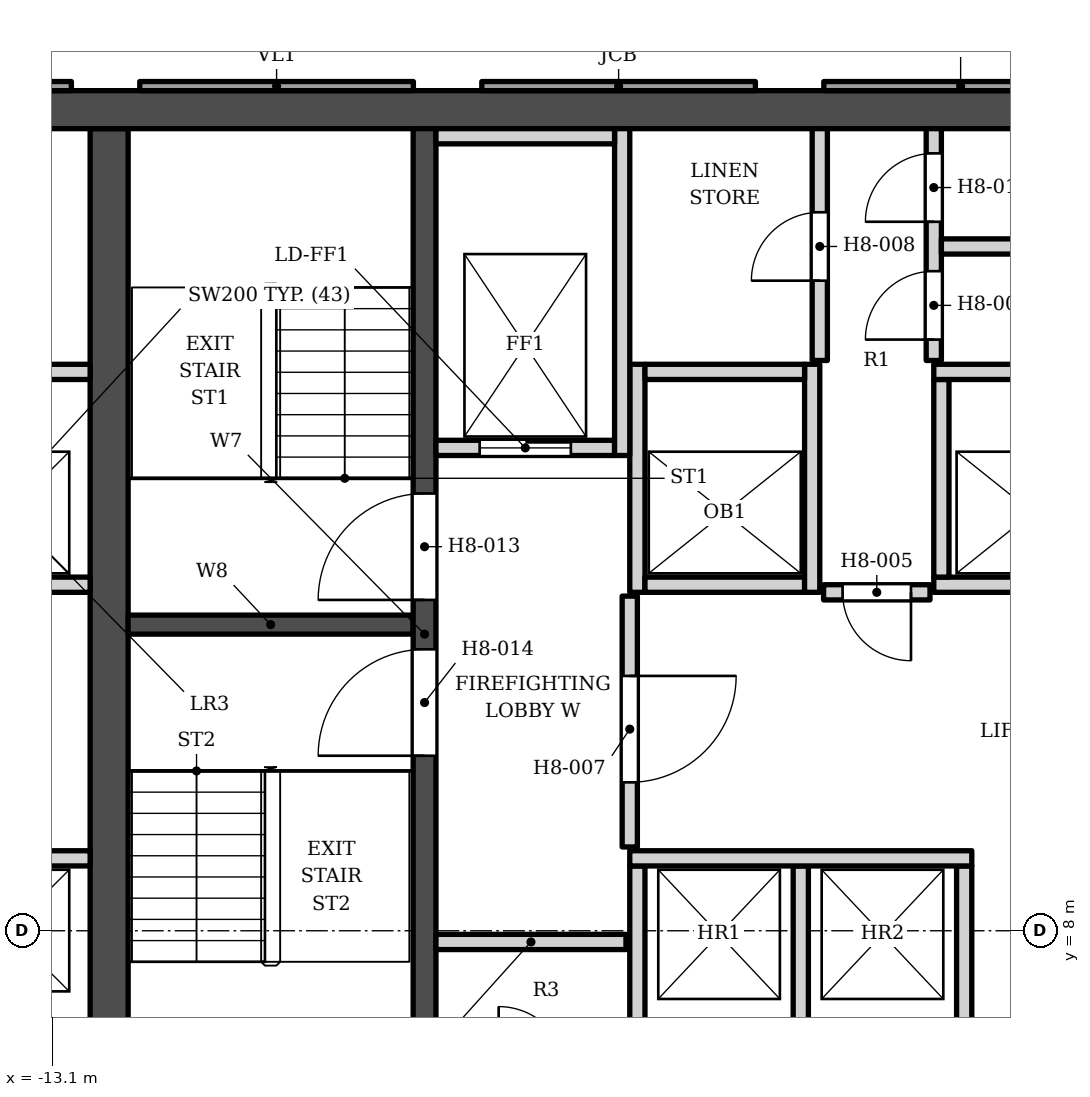
"""IFC4 building model, lengths in metres.
Left out: names, types, materials, properties, quantities, classifications, styles, units other than length and angle.
Written with IfcOpenShell. Run it as: python <this file> out.ifc"""

import sys

from ifc_helpers import new_model, si_unit, direction, frame, frame_2d, origin, place, context, subcontext, project, spatial, polyline, rectangle, outline, extrude, element, fill, save


model = new_model("IFC4")
c1 = context("Model", 3, precision=1e-05, world=origin(), true_north=direction((0.0, 1.0)))
c2 = subcontext(c1, "Body", "Model", "MODEL_VIEW")
j1 = project(units=[si_unit("LENGTHUNIT", "METRE"), si_unit("PLANEANGLEUNIT", "RADIAN")], contexts=[c1])
p1 = place(None, origin())
s1 = spatial("IfcSite", under=j1, at=p1, CompositionType="ELEMENT")
p2 = place(p1, origin())
s2 = spatial("IfcBuilding", under=s1, at=p2, CompositionType="ELEMENT")
p3 = place(p2, frame((0.0, 0.0, 122.4)))
s3 = spatial("IfcBuildingStorey", under=s2, at=p3, CompositionType="ELEMENT", Elevation=122.4)
p4 = place(p3, frame((-16.9, 18.802, 0.0), z_axis=(0.0, 0.0, 1.0), x_axis=(1.0, 0.0, 0.0)))
e1 = element("IfcWall", 1, at=p4, inside=s3, PredefinedType="SHEAR", context=c2, shape_type="SweptSolid", body=[
    extrude(rectangle(XDim=33.8, YDim=0.5, at=frame_2d((16.9, 0.0))), origin(), (0.0, 0.0, 1.0), 3.4),
])
p5 = place(p3, frame((-12.35, 5.253, 0.0), z_axis=(0.0, 0.0, 1.0), x_axis=(0.0, 1.0, 0.0)))
e2 = element("IfcWall", 2, at=p5, inside=s3, PredefinedType="SHEAR", context=c2, shape_type="SweptSolid", body=[
    extrude(rectangle(XDim=13.3, YDim=0.5, at=frame_2d((6.65, 0.0))), origin(), (0.0, 0.0, 1.0), 3.4),
])
p6 = place(p3, frame((-8.2, 5.253, 0.0), z_axis=(0.0, 0.0, 1.0), x_axis=(0.0, 1.0, 0.0)))
e3 = element("IfcWall", 3, at=p6, inside=s3, PredefinedType="SHEAR", context=c2, shape_type="SweptSolid", body=[
    extrude(rectangle(XDim=13.3, YDim=0.3, at=frame_2d((6.65, 0.0))), origin(), (0.0, 0.0, 1.0), 3.4),
])
p7 = place(p6, frame((7.1, 0.0, 0.0)))
e4 = element("IfcOpeningElement", 4, at=p7, cuts=e3, PredefinedType="OPENING", context=c2, shape_type="SweptSolid", body=[
    extrude(rectangle(XDim=1.4, YDim=2.1, at=frame_2d((0.7, 1.05))), frame((0.0, 0.16, 0.0), z_axis=(0.0, -1.0, 0.0), x_axis=(1.0, 0.0, 0.0)), (0.0, 0.0, 1.0), 0.32),
])
p8 = place(p6, frame((5.05, 0.0, 0.0)))
e5 = element("IfcOpeningElement", 5, at=p8, cuts=e3, PredefinedType="OPENING", context=c2, shape_type="SweptSolid", body=[
    extrude(rectangle(XDim=1.4, YDim=2.1, at=frame_2d((0.7, 1.05))), frame((0.0, 0.16, 0.0), z_axis=(0.0, -1.0, 0.0), x_axis=(1.0, 0.0, 0.0)), (0.0, 0.0, 1.0), 0.32),
])
p9 = place(p3, frame((-12.1, 12.028, 0.0), z_axis=(0.0, 0.0, 1.0), x_axis=(1.0, 0.0, 0.0)))
e6 = element("IfcWall", 6, at=p9, inside=s3, PredefinedType="SHEAR", context=c2, shape_type="SweptSolid", body=[
    extrude(rectangle(XDim=3.75, YDim=0.25, at=frame_2d((1.875, 0.0))), origin(), (0.0, 0.0, 1.0), 3.4),
])
p10 = place(p3, origin())
e7 = element("IfcWall", 7, at=p10, inside=s3, PredefinedType="ELEMENTEDWALL", context=c2, shape_type="SweptSolid", body=[
    extrude(outline(polyline([(-2.947, 19.173), (-2.947, 19.052), (0.653, 19.052), (0.653, 19.173), (-2.947, 19.173)])), origin(), (0.0, 0.0, 1.0), 2.65),
])
p11 = place(p3, origin())
e8 = element("IfcWall", 8, at=p11, inside=s3, PredefinedType="SOLIDWALL", context=c2, shape_type="SweptSolid", body=[
    extrude(outline(polyline([(-7.447, 19.173), (-7.447, 19.052), (-3.847, 19.052), (-3.847, 19.173), (-7.447, 19.173)])), origin(), (0.0, 0.0, 1.0), 2.65),
])
p12 = place(p3, origin())
e9 = element("IfcWall", 9, at=p12, inside=s3, PredefinedType="ELEMENTEDWALL", context=c2, shape_type="SweptSolid", body=[
    extrude(outline(polyline([(-11.947, 19.173), (-11.947, 19.052), (-8.347, 19.052), (-8.347, 19.173), (-11.947, 19.173)])), origin(), (0.0, 0.0, 1.0), 2.65),
])
p13 = place(p3, origin())
e10 = element("IfcWall", 10, at=p13, inside=s3, PredefinedType="SOLIDWALL", context=c2, shape_type="SweptSolid", body=[
    extrude(outline(polyline([(-16.446, 19.173), (-16.446, 19.052), (-12.847, 19.052), (-12.847, 19.173), (-16.446, 19.173)])), origin(), (0.0, 0.0, 1.0), 2.65),
])
for number, where, z_axis, x_axis in (
    (11, (-5.4, 6.353, 0.0), (0.0, 0.0, 1.0), (0.0, 1.0, 0.0)),
    (12, (-3.25, 6.353, 0.0), (0.0, 0.0, 1.0), (0.0, 1.0, 0.0)),
    (13, (-1.1, 6.353, 0.0), (0.0, 0.0, 1.0), (0.0, 1.0, 0.0)),
    (14, (-8.05, 7.853, 0.0), (0.0, 0.0, 1.0), (1.0, 0.0, 0.0)),
):
    element("IfcWall", number, at=place(p3, frame(where, z_axis=z_axis, x_axis=x_axis)), inside=s3, PredefinedType="SOLIDWALL", context=c2, shape_type="SweptSolid", body=[
        extrude(rectangle(XDim=2.5, YDim=0.2, at=frame_2d((1.25, 0.0))), origin(), (0.0, 0.0, 1.0), 3.23),
    ])
p14 = place(p3, frame((-16.9, 8.953, 0.0), z_axis=(0.0, 0.0, 1.0), x_axis=(1.0, 0.0, 0.0)))
e15 = element("IfcWall", 15, at=p14, inside=s3, PredefinedType="SOLIDWALL", context=c2, shape_type="SweptSolid", body=[
    extrude(rectangle(XDim=4.3, YDim=0.2, at=frame_2d((2.15, 0.0))), origin(), (0.0, 0.0, 1.0), 3.23),
])
p15 = place(p14, frame((2.675, 0.0, 0.0)))
e16 = element("IfcOpeningElement", 16, at=p15, cuts=e15, PredefinedType="OPENING", context=c2, shape_type="SweptSolid", body=[
    extrude(rectangle(XDim=1.1, YDim=2.1, at=frame_2d((0.55, 1.05))), frame((0.0, 0.11, 0.0), z_axis=(0.0, -1.0, 0.0), x_axis=(1.0, 0.0, 0.0)), (0.0, 0.0, 1.0), 0.22),
])
p16 = place(p14, frame((0.425, 0.0, 0.0)))
e17 = element("IfcOpeningElement", 17, at=p16, cuts=e15, PredefinedType="OPENING", context=c2, shape_type="SweptSolid", body=[
    extrude(rectangle(XDim=1.1, YDim=2.1, at=frame_2d((0.55, 1.05))), frame((0.0, 0.11, 0.0), z_axis=(0.0, -1.0, 0.0), x_axis=(1.0, 0.0, 0.0)), (0.0, 0.0, 1.0), 0.22),
])
p17 = place(p3, frame((-5.5, 8.953, 0.0), z_axis=(0.0, 0.0, 1.0), x_axis=(1.0, 0.0, 0.0)))
e18 = element("IfcWall", 18, at=p17, inside=s3, PredefinedType="SOLIDWALL", context=c2, shape_type="SweptSolid", body=[
    extrude(rectangle(XDim=4.5, YDim=0.2, at=frame_2d((2.25, 0.0))), origin(), (0.0, 0.0, 1.0), 3.23),
])
p18 = place(p3, frame((-5.5, 9.103, 0.0), z_axis=(0.0, 0.0, 1.0), x_axis=(0.0, 1.0, 0.0)))
e19 = element("IfcWall", 19, at=p18, inside=s3, PredefinedType="SOLIDWALL", context=c2, shape_type="SweptSolid", body=[
    extrude(rectangle(XDim=3.3, YDim=0.2, at=frame_2d((1.65, 0.0))), origin(), (0.0, 0.0, 1.0), 3.23),
])
p19 = place(p18, frame((0.85, 0.0, 0.0)))
e20 = element("IfcOpeningElement", 20, at=p19, cuts=e19, PredefinedType="OPENING", context=c2, shape_type="SweptSolid", body=[
    extrude(rectangle(XDim=1.4, YDim=2.1, at=frame_2d((0.7, 1.05))), frame((0.0, 0.11, 0.0), z_axis=(0.0, -1.0, 0.0), x_axis=(1.0, 0.0, 0.0)), (0.0, 0.0, 1.0), 0.22),
])
p20 = place(p3, frame((-2.95, 12.453, 0.0), z_axis=(0.0, 0.0, 1.0), x_axis=(1.0, 0.0, 0.0)))
e21 = element("IfcWall", 21, at=p20, inside=s3, PredefinedType="SOLIDWALL", context=c2, shape_type="SweptSolid", body=[
    extrude(rectangle(XDim=1.4, YDim=0.2, at=frame_2d((0.7, 0.0))), origin(), (0.0, 0.0, 1.0), 3.23),
])
p21 = place(p20, frame((0.25, 0.0, 0.0)))
e22 = element("IfcOpeningElement", 22, at=p21, cuts=e21, PredefinedType="OPENING", context=c2, shape_type="SweptSolid", body=[
    extrude(rectangle(XDim=0.9, YDim=2.1, at=frame_2d((0.45, 1.05))), frame((0.0, 0.11, 0.0), z_axis=(0.0, -1.0, 0.0), x_axis=(1.0, 0.0, 0.0)), (0.0, 0.0, 1.0), 0.22),
])
p22 = place(p3, frame((-16.9, 12.552, 0.0), z_axis=(0.0, 0.0, 1.0), x_axis=(1.0, 0.0, 0.0)))
e23 = element("IfcWall", 23, at=p22, inside=s3, PredefinedType="SOLIDWALL", context=c2, shape_type="SweptSolid", body=[
    extrude(rectangle(XDim=4.3, YDim=0.2, at=frame_2d((2.15, 0.0))), origin(), (0.0, 0.0, 1.0), 3.23),
])
p23 = place(p22, frame((2.675, 0.0, 0.0)))
e24 = element("IfcOpeningElement", 24, at=p23, cuts=e23, PredefinedType="OPENING", context=c2, shape_type="SweptSolid", body=[
    extrude(rectangle(XDim=1.1, YDim=2.1, at=frame_2d((0.55, 1.05))), frame((0.0, 0.11, 0.0), z_axis=(0.0, -1.0, 0.0), x_axis=(1.0, 0.0, 0.0)), (0.0, 0.0, 1.0), 0.22),
])
p24 = place(p22, frame((0.425, 0.0, 0.0)))
e25 = element("IfcOpeningElement", 25, at=p24, cuts=e23, PredefinedType="OPENING", context=c2, shape_type="SweptSolid", body=[
    extrude(rectangle(XDim=1.1, YDim=2.1, at=frame_2d((0.55, 1.05))), frame((0.0, 0.11, 0.0), z_axis=(0.0, -1.0, 0.0), x_axis=(1.0, 0.0, 0.0)), (0.0, 0.0, 1.0), 0.22),
])
p25 = place(p3, frame((-5.4, 12.453, 0.0), z_axis=(0.0, 0.0, 1.0), x_axis=(0.0, 1.0, 0.0)))
e26 = element("IfcWall", 26, at=p25, inside=s3, PredefinedType="SOLIDWALL", context=c2, shape_type="SweptSolid", body=[
    extrude(rectangle(XDim=3.0, YDim=0.2, at=frame_2d((1.5, 0.0))), origin(), (0.0, 0.0, 1.0), 3.23),
])
p26 = place(p3, frame((-5.3, 12.552, 0.0), z_axis=(0.0, 0.0, 1.0), x_axis=(1.0, 0.0, 0.0)))
e27 = element("IfcWall", 27, at=p26, inside=s3, PredefinedType="SOLIDWALL", context=c2, shape_type="SweptSolid", body=[
    extrude(rectangle(XDim=2.1, YDim=0.2, at=frame_2d((1.05, 0.0))), origin(), (0.0, 0.0, 1.0), 3.23),
])
p27 = place(p3, frame((-3.1, 12.453, 0.0), z_axis=(0.0, 0.0, 1.0), x_axis=(0.0, 1.0, 0.0)))
e28 = element("IfcWall", 28, at=p27, inside=s3, PredefinedType="SOLIDWALL", context=c2, shape_type="SweptSolid", body=[
    extrude(rectangle(XDim=3.0, YDim=0.2, at=frame_2d((1.5, 0.0))), origin(), (0.0, 0.0, 1.0), 3.23),
])
p28 = place(p3, frame((-1.5, 12.552, 0.0), z_axis=(0.0, 0.0, 1.0), x_axis=(1.0, 0.0, 0.0)))
e29 = element("IfcWall", 29, at=p28, inside=s3, PredefinedType="SOLIDWALL", context=c2, shape_type="SweptSolid", body=[
    extrude(rectangle(XDim=7.0, YDim=0.2, at=frame_2d((3.5, 0.0))), origin(), (0.0, 0.0, 1.0), 3.23),
])
p29 = place(p3, frame((-1.4, 12.653, 0.0), z_axis=(0.0, 0.0, 1.0), x_axis=(0.0, 1.0, 0.0)))
e30 = element("IfcWall", 30, at=p29, inside=s3, PredefinedType="SOLIDWALL", context=c2, shape_type="SweptSolid", body=[
    extrude(rectangle(XDim=2.6, YDim=0.2, at=frame_2d((1.3, 0.0))), origin(), (0.0, 0.0, 1.0), 3.23),
])
p30 = place(p3, frame((-8.05, 14.353, 0.0), z_axis=(0.0, 0.0, 1.0), x_axis=(1.0, 0.0, 0.0)))
e31 = element("IfcWall", 31, at=p30, inside=s3, PredefinedType="SOLIDWALL", context=c2, shape_type="SweptSolid", body=[
    extrude(rectangle(XDim=2.35, YDim=0.2, at=frame_2d((1.175, 0.0))), origin(), (0.0, 0.0, 1.0), 3.23),
])
p31 = place(p30, frame((0.575, 0.0, 0.0)))
e32 = element("IfcOpeningElement", 32, at=p31, cuts=e31, PredefinedType="OPENING", context=c2, shape_type="SweptSolid", body=[
    extrude(rectangle(XDim=1.2, YDim=2.1, at=frame_2d((0.6, 1.05))), frame((0.0, 0.11, 0.0), z_axis=(0.0, -1.0, 0.0), x_axis=(1.0, 0.0, 0.0)), (0.0, 0.0, 1.0), 0.22),
])
for number, where, z_axis, x_axis in (
    (33, (-5.6, 14.253, 0.0), (0.0, 0.0, 1.0), (0.0, 1.0, 0.0)),
    (34, (-16.9, 15.353, 0.0), (0.0, 0.0, 1.0), (1.0, 0.0, 0.0)),
):
    element("IfcWall", number, at=place(p3, frame(where, z_axis=z_axis, x_axis=x_axis)), inside=s3, PredefinedType="SOLIDWALL", context=c2, shape_type="SweptSolid", body=[
        extrude(rectangle(XDim=4.3, YDim=0.2, at=frame_2d((2.15, 0.0))), origin(), (0.0, 0.0, 1.0), 3.23),
    ])
p32 = place(p3, frame((-5.3, 15.353, 0.0), z_axis=(0.0, 0.0, 1.0), x_axis=(1.0, 0.0, 0.0)))
e35 = element("IfcWall", 35, at=p32, inside=s3, PredefinedType="SOLIDWALL", context=c2, shape_type="SweptSolid", body=[
    extrude(rectangle(XDim=2.1, YDim=0.2, at=frame_2d((1.05, 0.0))), origin(), (0.0, 0.0, 1.0), 3.23),
])
p33 = place(p3, frame((-1.5, 15.353, 0.0), z_axis=(0.0, 0.0, 1.0), x_axis=(1.0, 0.0, 0.0)))
e36 = element("IfcWall", 36, at=p33, inside=s3, PredefinedType="SOLIDWALL", context=c2, shape_type="SweptSolid", body=[
    extrude(rectangle(XDim=7.2, YDim=0.2, at=frame_2d((3.6, 0.0))), origin(), (0.0, 0.0, 1.0), 3.23),
])
p34 = place(p3, frame((-3.0, 15.503, 0.0), z_axis=(0.0, 0.0, 1.0), x_axis=(0.0, 1.0, 0.0)))
e37 = element("IfcWall", 37, at=p34, inside=s3, PredefinedType="SOLIDWALL", context=c2, shape_type="SweptSolid", body=[
    extrude(rectangle(XDim=3.05, YDim=0.2, at=frame_2d((1.525, 0.0))), origin(), (0.0, 0.0, 1.0), 3.23),
])
p35 = place(p34, frame((1.05, 0.0, 0.0)))
e38 = element("IfcOpeningElement", 38, at=p35, cuts=e37, PredefinedType="OPENING", context=c2, shape_type="SweptSolid", body=[
    extrude(rectangle(XDim=0.9, YDim=2.1, at=frame_2d((0.45, 1.05))), frame((0.0, 0.11, 0.0), z_axis=(0.0, -1.0, 0.0), x_axis=(1.0, 0.0, 0.0)), (0.0, 0.0, 1.0), 0.22),
])
p36 = place(p3, frame((-1.5, 15.503, 0.0), z_axis=(0.0, 0.0, 1.0), x_axis=(0.0, 1.0, 0.0)))
e39 = element("IfcWall", 39, at=p36, inside=s3, PredefinedType="SOLIDWALL", context=c2, shape_type="SweptSolid", body=[
    extrude(rectangle(XDim=3.05, YDim=0.2, at=frame_2d((1.525, 0.0))), origin(), (0.0, 0.0, 1.0), 3.23),
])
p37 = place(p36, frame((0.275, 0.0, 0.0)))
e40 = element("IfcOpeningElement", 40, at=p37, cuts=e39, PredefinedType="OPENING", context=c2, shape_type="SweptSolid", body=[
    extrude(rectangle(XDim=0.9, YDim=2.1, at=frame_2d((0.45, 1.05))), frame((0.0, 0.11, 0.0), z_axis=(0.0, -1.0, 0.0), x_axis=(1.0, 0.0, 0.0)), (0.0, 0.0, 1.0), 0.22),
])
p38 = place(p36, frame((1.825, 0.0, 0.0)))
e41 = element("IfcOpeningElement", 41, at=p38, cuts=e39, PredefinedType="OPENING", context=c2, shape_type="SweptSolid", body=[
    extrude(rectangle(XDim=0.9, YDim=2.1, at=frame_2d((0.45, 1.05))), frame((0.0, 0.11, 0.0), z_axis=(0.0, -1.0, 0.0), x_axis=(1.0, 0.0, 0.0)), (0.0, 0.0, 1.0), 0.22),
])
p39 = place(p3, frame((-1.4, 17.003, 0.0), z_axis=(0.0, 0.0, 1.0), x_axis=(1.0, 0.0, 0.0)))
e42 = element("IfcWall", 42, at=p39, inside=s3, PredefinedType="SOLIDWALL", context=c2, shape_type="SweptSolid", body=[
    extrude(rectangle(XDim=6.85, YDim=0.2, at=frame_2d((3.425, 0.0))), origin(), (0.0, 0.0, 1.0), 3.23),
])
p40 = place(p3, frame((-8.05, 18.453, 0.0), z_axis=(0.0, 0.0, 1.0), x_axis=(1.0, 0.0, 0.0)))
e43 = element("IfcWall", 43, at=p40, inside=s3, PredefinedType="SOLIDWALL", context=c2, shape_type="SweptSolid", body=[
    extrude(rectangle(XDim=2.35, YDim=0.2, at=frame_2d((1.175, 0.0))), origin(), (0.0, 0.0, 1.0), 3.23),
])
p41 = place(p31, origin())
e44 = element("IfcDoor", 44, at=p41, inside=s3, OperationType="DOUBLE_DOOR_SLIDING", PredefinedType="DOOR", context=c2, shape_type="SweptSolid", body=[
    extrude(rectangle(XDim=1.2, YDim=2.1, at=frame_2d((0.6, 1.05))), frame((0.0, 0.025, 0.0), z_axis=(0.0, -1.0, 0.0), x_axis=(1.0, 0.0, 0.0)), (0.0, 0.0, 1.0), 0.05),
])
fill(e32, e44)
p42 = place(p7, origin())
e45 = element("IfcDoor", 45, at=p42, inside=s3, OperationType="SINGLE_SWING_LEFT", PredefinedType="DOOR", context=c2, shape_type="SweptSolid", body=[
    extrude(rectangle(XDim=1.4, YDim=2.1, at=frame_2d((0.7, 1.05))), frame((0.0, 0.025, 0.0), z_axis=(0.0, -1.0, 0.0), x_axis=(1.0, 0.0, 0.0)), (0.0, 0.0, 1.0), 0.05),
])
fill(e4, e45)
p43 = place(p8, origin())
e46 = element("IfcDoor", 46, at=p43, inside=s3, OperationType="SINGLE_SWING_LEFT", PredefinedType="DOOR", context=c2, shape_type="SweptSolid", body=[
    extrude(rectangle(XDim=1.4, YDim=2.1, at=frame_2d((0.7, 1.05))), frame((0.0, 0.025, 0.0), z_axis=(0.0, -1.0, 0.0), x_axis=(1.0, 0.0, 0.0)), (0.0, 0.0, 1.0), 0.05),
])
fill(e5, e46)
p44 = place(p21, origin())
e47 = element("IfcDoor", 47, at=p44, inside=s3, OperationType="SINGLE_SWING_RIGHT", PredefinedType="DOOR", context=c2, shape_type="SweptSolid", body=[
    extrude(rectangle(XDim=0.9, YDim=2.1, at=frame_2d((0.45, 1.05))), frame((0.0, 0.025, 0.0), z_axis=(0.0, -1.0, 0.0), x_axis=(1.0, 0.0, 0.0)), (0.0, 0.0, 1.0), 0.05),
])
fill(e22, e47)
p45 = place(p19, origin())
e48 = element("IfcDoor", 48, at=p45, inside=s3, OperationType="SINGLE_SWING_RIGHT", PredefinedType="DOOR", context=c2, shape_type="SweptSolid", body=[
    extrude(rectangle(XDim=1.4, YDim=2.1, at=frame_2d((0.7, 1.05))), frame((0.0, 0.025, 0.0), z_axis=(0.0, -1.0, 0.0), x_axis=(1.0, 0.0, 0.0)), (0.0, 0.0, 1.0), 0.05),
])
fill(e20, e48)
p46 = place(p35, origin())
e49 = element("IfcDoor", 49, at=p46, inside=s3, OperationType="SINGLE_SWING_LEFT", PredefinedType="DOOR", context=c2, shape_type="SweptSolid", body=[
    extrude(rectangle(XDim=0.9, YDim=2.1, at=frame_2d((0.45, 1.05))), frame((0.0, 0.025, 0.0), z_axis=(0.0, -1.0, 0.0), x_axis=(1.0, 0.0, 0.0)), (0.0, 0.0, 1.0), 0.05),
])
fill(e38, e49)
p47 = place(p37, origin())
e50 = element("IfcDoor", 50, at=p47, inside=s3, OperationType="SINGLE_SWING_LEFT", PredefinedType="DOOR", context=c2, shape_type="SweptSolid", body=[
    extrude(rectangle(XDim=0.9, YDim=2.1, at=frame_2d((0.45, 1.05))), frame((0.0, 0.025, 0.0), z_axis=(0.0, -1.0, 0.0), x_axis=(1.0, 0.0, 0.0)), (0.0, 0.0, 1.0), 0.05),
])
fill(e40, e50)
p48 = place(p38, origin())
e51 = element("IfcDoor", 51, at=p48, inside=s3, OperationType="SINGLE_SWING_LEFT", PredefinedType="DOOR", context=c2, shape_type="SweptSolid", body=[
    extrude(rectangle(XDim=0.9, YDim=2.1, at=frame_2d((0.45, 1.05))), frame((0.0, 0.025, 0.0), z_axis=(0.0, -1.0, 0.0), x_axis=(1.0, 0.0, 0.0)), (0.0, 0.0, 1.0), 0.05),
])
fill(e41, e51)
save(model, sys.argv[1])
